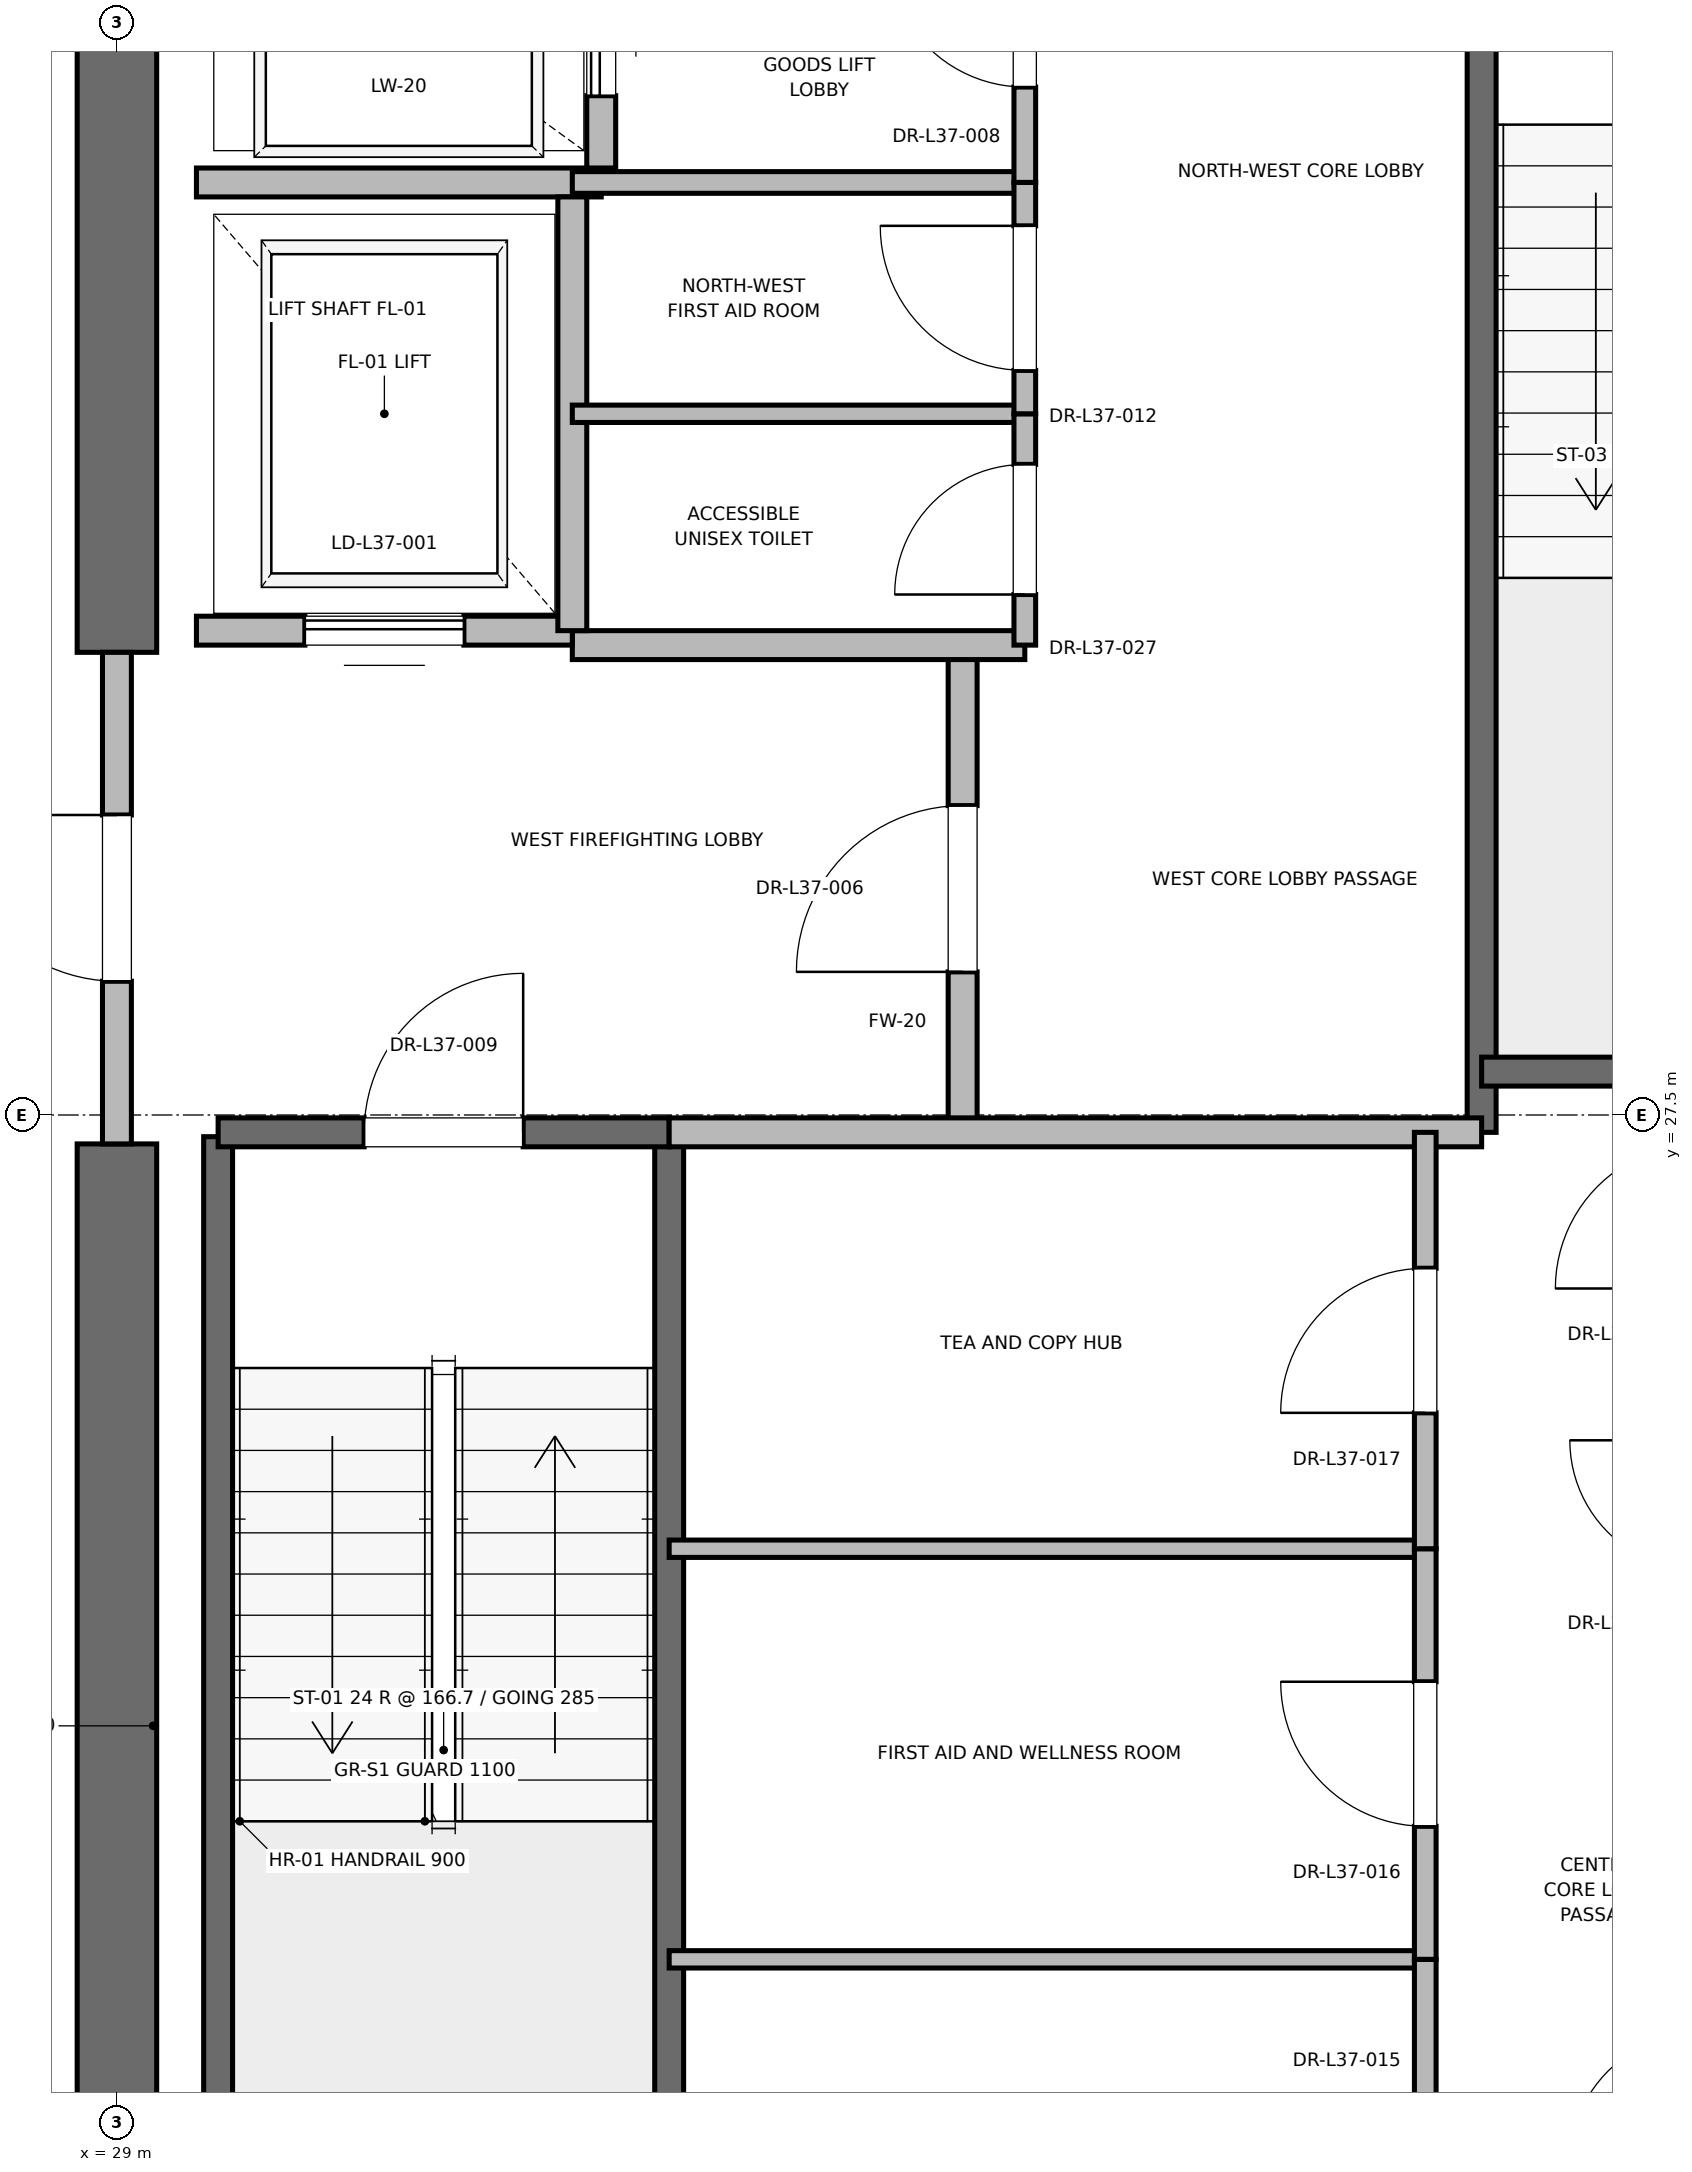
"""IFC4 building model, lengths in metres.
Left out: names, types, materials, properties, quantities, classifications, styles, units other than length and angle.
Written with IfcOpenShell. Run it as: python <this file> out.ifc"""

import sys

from ifc_helpers import new_model, si_unit, direction, frame, frame_2d, origin, place, context, subcontext, project, spatial, rectangle, extrude, element, fill, save


model = new_model("IFC4")
c1 = context("Model", 3, precision=1e-05, world=origin(), true_north=direction((0.0, 1.0)))
c2 = subcontext(c1, "Body", "Model", "MODEL_VIEW")
j1 = project(units=[si_unit("LENGTHUNIT", "METRE"), si_unit("PLANEANGLEUNIT", "RADIAN")], contexts=[c1])
p1 = place(None, origin())
s1 = spatial("IfcSite", under=j1, at=p1, CompositionType="ELEMENT")
p2 = place(p1, origin())
s2 = spatial("IfcBuilding", under=s1, at=p2, CompositionType="ELEMENT")
p3 = place(p2, frame((0.0, 0.0, 160.4)))
s3 = spatial("IfcBuildingStorey", under=s2, at=p3, CompositionType="ELEMENT", Elevation=160.4)
p4 = place(p3, frame((29.0, 18.5, 0.0), z_axis=(0.0, 0.0, 1.0), x_axis=(0.0, 1.0, 0.0)))
e1 = element("IfcWall", 1, at=p4, inside=s3, PredefinedType="SHEAR", context=c2, shape_type="SweptSolid", body=[
    extrude(rectangle(XDim=8.8, YDim=0.55, at=frame_2d((4.4, 0.0))), origin(), (0.0, 0.0, 1.0), 3.775),
])
p5 = place(p3, frame((29.0, 30.7, 0.0), z_axis=(0.0, 0.0, 1.0), x_axis=(0.0, 1.0, 0.0)))
e2 = element("IfcWall", 2, at=p5, inside=s3, PredefinedType="SHEAR", context=c2, shape_type="SweptSolid", body=[
    extrude(rectangle(XDim=5.8, YDim=0.55, at=frame_2d((2.9, 0.0))), origin(), (0.0, 0.0, 1.0), 3.775),
])
p6 = place(p3, frame((29.7, 19.2, 0.0), z_axis=(0.0, 0.0, 1.0), x_axis=(0.0, 1.0, 0.0)))
e3 = element("IfcWall", 3, at=p6, inside=s3, PredefinedType="SOLIDWALL", context=c2, shape_type="SweptSolid", body=[
    extrude(rectangle(XDim=8.15, YDim=0.2, at=frame_2d((4.075, 0.0))), origin(), (0.0, 0.0, 1.0), 3.775),
])
p7 = place(p3, frame((32.82, 18.6, 0.0), z_axis=(0.0, 0.0, 1.0), x_axis=(0.0, 1.0, 0.0)))
e4 = element("IfcWall", 4, at=p7, inside=s3, PredefinedType="SOLIDWALL", context=c2, shape_type="SweptSolid", body=[
    extrude(rectangle(XDim=8.78, YDim=0.2, at=frame_2d((4.39, 0.0))), origin(), (0.0, 0.0, 1.0), 3.775),
])
p8 = place(p3, frame((29.7, 27.38, 0.0), z_axis=(0.0, 0.0, 1.0), x_axis=(1.0, 0.0, 0.0)))
e5 = element("IfcWall", 5, at=p8, inside=s3, PredefinedType="SOLIDWALL", context=c2, shape_type="SweptSolid", body=[
    extrude(rectangle(XDim=3.12, YDim=0.2, at=frame_2d((1.56, 0.0))), origin(), (0.0, 0.0, 1.0), 3.775),
])
p9 = place(p8, frame((1.01, 0.0, 0.0)))
e6 = element("IfcOpeningElement", 6, at=p9, cuts=e5, PredefinedType="OPENING", context=c2, shape_type="SweptSolid", body=[
    extrude(rectangle(XDim=1.1, YDim=2.15, at=frame_2d((0.55, 1.075))), frame((0.0, 0.1, 0.0), z_axis=(0.0, -1.0, 0.0), x_axis=(1.0, 0.0, 0.0)), (0.0, 0.0, 1.0), 0.2),
])
p10 = place(p3, frame((38.44, 27.38, 0.0), z_axis=(0.0, 0.0, 1.0), x_axis=(0.0, 1.0, 0.0)))
e7 = element("IfcWall", 7, at=p10, inside=s3, PredefinedType="SOLIDWALL", context=c2, shape_type="SweptSolid", body=[
    extrude(rectangle(XDim=8.87, YDim=0.2, at=frame_2d((4.435, 0.0))), origin(), (0.0, 0.0, 1.0), 3.775),
])
p11 = place(p3, frame((38.44, 27.8, 0.0), z_axis=(0.0, 0.0, 1.0), x_axis=(1.0, 0.0, 0.0)))
e8 = element("IfcWall", 8, at=p11, inside=s3, PredefinedType="SOLIDWALL", context=c2, shape_type="SweptSolid", body=[
    extrude(rectangle(XDim=3.32, YDim=0.2, at=frame_2d((1.66, 0.0))), origin(), (0.0, 0.0, 1.0), 3.775),
])
p12 = place(p3, frame((34.85, 27.38, 0.0), z_axis=(0.0, 0.0, 1.0), x_axis=(0.0, 1.0, 0.0)))
e9 = element("IfcWall", 9, at=p12, inside=s3, PredefinedType="PARTITIONING", context=c2, shape_type="SweptSolid", body=[
    extrude(rectangle(XDim=3.37, YDim=0.2, at=frame_2d((1.685, 0.0))), origin(), (0.0, 0.0, 1.0), 3.775),
])
p13 = place(p12, frame((1.11, 0.0, 0.0)))
e10 = element("IfcOpeningElement", 10, at=p13, cuts=e9, PredefinedType="OPENING", context=c2, shape_type="SweptSolid", body=[
    extrude(rectangle(XDim=1.15, YDim=2.2, at=frame_2d((0.575, 1.1))), frame((0.0, 0.1, 0.0), z_axis=(0.0, -1.0, 0.0), x_axis=(1.0, 0.0, 0.0)), (0.0, 0.0, 1.0), 0.2),
])
p14 = place(p3, frame((29.0, 27.3, 0.0), z_axis=(0.0, 0.0, 1.0), x_axis=(0.0, 1.0, 0.0)))
e11 = element("IfcWall", 11, at=p14, inside=s3, PredefinedType="PARTITIONING", context=c2, shape_type="SweptSolid", body=[
    extrude(rectangle(XDim=3.4, YDim=0.2, at=frame_2d((1.7, 0.0))), origin(), (0.0, 0.0, 1.0), 2.755),
])
p15 = place(p14, frame((1.125, 0.0, 0.0)))
e12 = element("IfcOpeningElement", 12, at=p15, cuts=e11, PredefinedType="OPENING", context=c2, shape_type="SweptSolid", body=[
    extrude(rectangle(XDim=1.15, YDim=2.2, at=frame_2d((0.575, 1.1))), frame((0.0, 0.1, 0.0), z_axis=(0.0, -1.0, 0.0), x_axis=(1.0, 0.0, 0.0)), (0.0, 0.0, 1.0), 0.2),
])
p16 = place(p3, frame((32.82, 27.38, 0.0), z_axis=(0.0, 0.0, 1.0), x_axis=(1.0, 0.0, 0.0)))
e13 = element("IfcWall", 13, at=p16, inside=s3, PredefinedType="PARTITIONING", context=c2, shape_type="SweptSolid", body=[
    extrude(rectangle(XDim=5.62, YDim=0.2, at=frame_2d((2.81, 0.0))), origin(), (0.0, 0.0, 1.0), 3.775),
])
p17 = place(p3, frame((32.15, 30.75, 0.0), z_axis=(0.0, 0.0, 1.0), x_axis=(1.0, 0.0, 0.0)))
e14 = element("IfcWall", 14, at=p17, inside=s3, PredefinedType="PARTITIONING", context=c2, shape_type="SweptSolid", body=[
    extrude(rectangle(XDim=3.13, YDim=0.2, at=frame_2d((1.565, 0.0))), origin(), (0.0, 0.0, 1.0), 3.775),
])
p18 = place(p3, frame((29.55, 30.85, 0.0), z_axis=(0.0, 0.0, 1.0), x_axis=(1.0, 0.0, 0.0)))
e15 = element("IfcWall", 15, at=p18, inside=s3, PredefinedType="SOLIDWALL", context=c2, shape_type="SweptSolid", body=[
    extrude(rectangle(XDim=2.6, YDim=0.2, at=frame_2d((1.3, 0.0))), origin(), (0.0, 0.0, 1.0), 2.755),
])
p19 = place(p18, frame((0.75, 0.0, 0.0)))
e16 = element("IfcOpeningElement", 16, at=p19, cuts=e15, PredefinedType="OPENING", context=c2, shape_type="SweptSolid", body=[
    extrude(rectangle(XDim=1.1, YDim=2.2, at=frame_2d((0.55, 1.1))), frame((0.0, 0.1, 0.0), z_axis=(0.0, -1.0, 0.0), x_axis=(1.0, 0.0, 0.0)), (0.0, 0.0, 1.0), 0.2),
])
p20 = place(p3, frame((29.55, 33.95, 0.0), z_axis=(0.0, 0.0, 1.0), x_axis=(1.0, 0.0, 0.0)))
e17 = element("IfcWall", 17, at=p20, inside=s3, PredefinedType="SOLIDWALL", context=c2, shape_type="SweptSolid", body=[
    extrude(rectangle(XDim=2.8, YDim=0.2, at=frame_2d((1.4, 0.0))), origin(), (0.0, 0.0, 1.0), 3.775),
])
p21 = place(p3, frame((32.15, 30.85, 0.0), z_axis=(0.0, 0.0, 1.0), x_axis=(0.0, 1.0, 0.0)))
e18 = element("IfcWall", 18, at=p21, inside=s3, PredefinedType="SOLIDWALL", context=c2, shape_type="SweptSolid", body=[
    extrude(rectangle(XDim=3.0, YDim=0.2, at=frame_2d((1.5, 0.0))), origin(), (0.0, 0.0, 1.0), 3.775),
])
p22 = place(p3, frame((32.35, 34.05, 0.0), z_axis=(0.0, 0.0, 1.0), x_axis=(0.0, 1.0, 0.0)))
e19 = element("IfcWall", 19, at=p22, inside=s3, PredefinedType="SOLIDWALL", context=c2, shape_type="SweptSolid", body=[
    extrude(rectangle(XDim=2.1, YDim=0.2, at=frame_2d((1.05, 0.0))), origin(), (0.0, 0.0, 1.0), 3.775),
])
p23 = place(p22, frame((0.5, 0.0, 0.0)))
e20 = element("IfcOpeningElement", 20, at=p23, cuts=e19, PredefinedType="OPENING", context=c2, shape_type="SweptSolid", body=[
    extrude(rectangle(XDim=1.1, YDim=2.2, at=frame_2d((0.55, 1.1))), frame((0.0, 0.1, 0.0), z_axis=(0.0, -1.0, 0.0), x_axis=(1.0, 0.0, 0.0)), (0.0, 0.0, 1.0), 0.2),
])
p24 = place(p3, frame((32.15, 33.95, 0.0), z_axis=(0.0, 0.0, 1.0), x_axis=(1.0, 0.0, 0.0)))
e21 = element("IfcWall", 21, at=p24, inside=s3, PredefinedType="PARTITIONING", context=c2, shape_type="SweptSolid", body=[
    extrude(rectangle(XDim=3.13, YDim=0.15, at=frame_2d((1.565, 0.0))), origin(), (0.0, 0.0, 1.0), 2.85),
])
p25 = place(p3, frame((35.28, 33.95, 0.0), z_axis=(0.0, 0.0, 1.0), x_axis=(0.0, 1.0, 0.0)))
e22 = element("IfcWall", 22, at=p25, inside=s3, PredefinedType="PARTITIONING", context=c2, shape_type="SweptSolid", body=[
    extrude(rectangle(XDim=2.27, YDim=0.15, at=frame_2d((1.135, 0.0))), origin(), (0.0, 0.0, 1.0), 2.755),
])
p26 = place(p25, frame((0.66, 0.0, 0.0)))
e23 = element("IfcOpeningElement", 23, at=p26, cuts=e22, PredefinedType="OPENING", context=c2, shape_type="SweptSolid", body=[
    extrude(rectangle(XDim=0.95, YDim=2.15, at=frame_2d((0.475, 1.075))), frame((0.0, 0.075, 0.0), z_axis=(0.0, -1.0, 0.0), x_axis=(1.0, 0.0, 0.0)), (0.0, 0.0, 1.0), 0.15),
])
p27 = place(p3, frame((32.15, 32.35, 0.0), z_axis=(0.0, 0.0, 1.0), x_axis=(1.0, 0.0, 0.0)))
e24 = element("IfcWall", 24, at=p27, inside=s3, PredefinedType="PARTITIONING", context=c2, shape_type="SweptSolid", body=[
    extrude(rectangle(XDim=3.13, YDim=0.12, at=frame_2d((1.565, 0.0))), origin(), (0.0, 0.0, 1.0), 2.85),
])
p28 = place(p3, frame((35.28, 30.75, 0.0), z_axis=(0.0, 0.0, 1.0), x_axis=(0.0, 1.0, 0.0)))
e25 = element("IfcWall", 25, at=p28, inside=s3, PredefinedType="PARTITIONING", context=c2, shape_type="SweptSolid", body=[
    extrude(rectangle(XDim=1.6, YDim=0.15, at=frame_2d((0.8, 0.0))), origin(), (0.0, 0.0, 1.0), 2.85),
])
p29 = place(p28, frame((0.35, 0.0, 0.0)))
e26 = element("IfcOpeningElement", 26, at=p29, cuts=e25, PredefinedType="OPENING", context=c2, shape_type="SweptSolid", body=[
    extrude(rectangle(XDim=0.9, YDim=2.1, at=frame_2d((0.45, 1.05))), frame((0.0, 0.075, 0.0), z_axis=(0.0, -1.0, 0.0), x_axis=(1.0, 0.0, 0.0)), (0.0, 0.0, 1.0), 0.15),
])
p30 = place(p3, frame((35.28, 32.35, 0.0), z_axis=(0.0, 0.0, 1.0), x_axis=(0.0, 1.0, 0.0)))
e27 = element("IfcWall", 27, at=p30, inside=s3, PredefinedType="PARTITIONING", context=c2, shape_type="SweptSolid", body=[
    extrude(rectangle(XDim=1.6, YDim=0.15, at=frame_2d((0.8, 0.0))), origin(), (0.0, 0.0, 1.0), 2.85),
])
p31 = place(p30, frame((0.3, 0.0, 0.0)))
e28 = element("IfcOpeningElement", 28, at=p31, cuts=e27, PredefinedType="OPENING", context=c2, shape_type="SweptSolid", body=[
    extrude(rectangle(XDim=1.0, YDim=2.15, at=frame_2d((0.5, 1.075))), frame((0.0, 0.075, 0.0), z_axis=(0.0, -1.0, 0.0), x_axis=(1.0, 0.0, 0.0)), (0.0, 0.0, 1.0), 0.15),
])
for number, where, z_axis, x_axis in (
    (29, (32.82, 21.66, 0.0), (0.0, 0.0, 1.0), (1.0, 0.0, 0.0)),
    (30, (32.82, 24.5, 0.0), (0.0, 0.0, 1.0), (1.0, 0.0, 0.0)),
):
    element("IfcWall", number, at=place(p3, frame(where, z_axis=z_axis, x_axis=x_axis)), inside=s3, PredefinedType="PARTITIONING", context=c2, shape_type="SweptSolid", body=[
        extrude(rectangle(XDim=5.23, YDim=0.12, at=frame_2d((2.615, 0.0))), origin(), (0.0, 0.0, 1.0), 2.85),
    ])
p32 = place(p3, frame((38.05, 18.6, 0.0), z_axis=(0.0, 0.0, 1.0), x_axis=(0.0, 1.0, 0.0)))
e31 = element("IfcWall", 31, at=p32, inside=s3, PredefinedType="PARTITIONING", context=c2, shape_type="SweptSolid", body=[
    extrude(rectangle(XDim=3.06, YDim=0.15, at=frame_2d((1.53, 0.0))), origin(), (0.0, 0.0, 1.0), 2.755),
])
p33 = place(p32, frame((1.03, 0.0, 0.0)))
e32 = element("IfcOpeningElement", 32, at=p33, cuts=e31, PredefinedType="OPENING", context=c2, shape_type="SweptSolid", body=[
    extrude(rectangle(XDim=1.0, YDim=2.15, at=frame_2d((0.5, 1.075))), frame((0.0, 0.075, 0.0), z_axis=(0.0, -1.0, 0.0), x_axis=(1.0, 0.0, 0.0)), (0.0, 0.0, 1.0), 0.15),
])
p34 = place(p3, frame((38.05, 21.66, 0.0), z_axis=(0.0, 0.0, 1.0), x_axis=(0.0, 1.0, 0.0)))
e33 = element("IfcWall", 33, at=p34, inside=s3, PredefinedType="PARTITIONING", context=c2, shape_type="SweptSolid", body=[
    extrude(rectangle(XDim=2.84, YDim=0.15, at=frame_2d((1.42, 0.0))), origin(), (0.0, 0.0, 1.0), 2.85),
])
p35 = place(p34, frame((0.92, 0.0, 0.0)))
e34 = element("IfcOpeningElement", 34, at=p35, cuts=e33, PredefinedType="OPENING", context=c2, shape_type="SweptSolid", body=[
    extrude(rectangle(XDim=1.0, YDim=2.15, at=frame_2d((0.5, 1.075))), frame((0.0, 0.075, 0.0), z_axis=(0.0, -1.0, 0.0), x_axis=(1.0, 0.0, 0.0)), (0.0, 0.0, 1.0), 0.15),
])
p36 = place(p3, frame((38.05, 24.5, 0.0), z_axis=(0.0, 0.0, 1.0), x_axis=(0.0, 1.0, 0.0)))
e35 = element("IfcWall", 35, at=p36, inside=s3, PredefinedType="PARTITIONING", context=c2, shape_type="SweptSolid", body=[
    extrude(rectangle(XDim=2.88, YDim=0.15, at=frame_2d((1.44, 0.0))), origin(), (0.0, 0.0, 1.0), 2.85),
])
p37 = place(p36, frame((0.94, 0.0, 0.0)))
e36 = element("IfcOpeningElement", 36, at=p37, cuts=e35, PredefinedType="OPENING", context=c2, shape_type="SweptSolid", body=[
    extrude(rectangle(XDim=1.0, YDim=2.15, at=frame_2d((0.5, 1.075))), frame((0.0, 0.075, 0.0), z_axis=(0.0, -1.0, 0.0), x_axis=(1.0, 0.0, 0.0)), (0.0, 0.0, 1.0), 0.15),
])
p38 = place(p9, origin())
e37 = element("IfcDoor", 37, at=p38, inside=s3, OperationType="SINGLE_SWING_RIGHT", PredefinedType="DOOR", context=c2, shape_type="SweptSolid", body=[
    extrude(rectangle(XDim=1.1, YDim=2.15, at=frame_2d((0.55, 1.075))), frame((0.0, 0.025, 0.0), z_axis=(0.0, -1.0, 0.0), x_axis=(1.0, 0.0, 0.0)), (0.0, 0.0, 1.0), 0.05),
])
fill(e6, e37)
p39 = place(p13, origin())
e38 = element("IfcDoor", 38, at=p39, inside=s3, OperationType="SINGLE_SWING_LEFT", PredefinedType="DOOR", context=c2, shape_type="SweptSolid", body=[
    extrude(rectangle(XDim=1.15, YDim=2.2, at=frame_2d((0.575, 1.1))), frame((0.0, 0.025, 0.0), z_axis=(0.0, -1.0, 0.0), x_axis=(1.0, 0.0, 0.0)), (0.0, 0.0, 1.0), 0.05),
])
fill(e10, e38)
p40 = place(p15, origin())
e39 = element("IfcDoor", 39, at=p40, inside=s3, OperationType="SINGLE_SWING_RIGHT", PredefinedType="DOOR", context=c2, shape_type="SweptSolid", body=[
    extrude(rectangle(XDim=1.15, YDim=2.2, at=frame_2d((0.575, 1.1))), frame((0.0, 0.025, 0.0), z_axis=(0.0, -1.0, 0.0), x_axis=(1.0, 0.0, 0.0)), (0.0, 0.0, 1.0), 0.05),
])
fill(e12, e39)
p41 = place(p19, origin())
e40 = element("IfcDoor", 40, at=p41, inside=s3, OperationType="SLIDING_TO_RIGHT", PredefinedType="DOOR", context=c2, shape_type="SweptSolid", body=[
    extrude(rectangle(XDim=1.1, YDim=2.2, at=frame_2d((0.55, 1.1))), frame((0.0, 0.025, 0.0), z_axis=(0.0, -1.0, 0.0), x_axis=(1.0, 0.0, 0.0)), (0.0, 0.0, 1.0), 0.05),
])
fill(e16, e40)
p42 = place(p23, origin())
e41 = element("IfcDoor", 41, at=p42, inside=s3, OperationType="SLIDING_TO_RIGHT", PredefinedType="DOOR", context=c2, shape_type="SweptSolid", body=[
    extrude(rectangle(XDim=1.1, YDim=2.2, at=frame_2d((0.55, 1.1))), frame((0.0, 0.025, 0.0), z_axis=(0.0, -1.0, 0.0), x_axis=(1.0, 0.0, 0.0)), (0.0, 0.0, 1.0), 0.05),
])
fill(e20, e41)
p43 = place(p26, origin())
e42 = element("IfcDoor", 42, at=p43, inside=s3, OperationType="SINGLE_SWING_RIGHT", PredefinedType="DOOR", context=c2, shape_type="SweptSolid", body=[
    extrude(rectangle(XDim=0.95, YDim=2.15, at=frame_2d((0.475, 1.075))), frame((0.0, 0.025, 0.0), z_axis=(0.0, -1.0, 0.0), x_axis=(1.0, 0.0, 0.0)), (0.0, 0.0, 1.0), 0.05),
])
fill(e23, e42)
p44 = place(p29, origin())
e43 = element("IfcDoor", 43, at=p44, inside=s3, OperationType="SINGLE_SWING_LEFT", PredefinedType="DOOR", context=c2, shape_type="SweptSolid", body=[
    extrude(rectangle(XDim=0.9, YDim=2.1, at=frame_2d((0.45, 1.05))), frame((0.0, 0.025, 0.0), z_axis=(0.0, -1.0, 0.0), x_axis=(1.0, 0.0, 0.0)), (0.0, 0.0, 1.0), 0.05),
])
fill(e26, e43)
p45 = place(p31, origin())
e44 = element("IfcDoor", 44, at=p45, inside=s3, OperationType="SINGLE_SWING_RIGHT", PredefinedType="DOOR", context=c2, shape_type="SweptSolid", body=[
    extrude(rectangle(XDim=1.0, YDim=2.15, at=frame_2d((0.5, 1.075))), frame((0.0, 0.025, 0.0), z_axis=(0.0, -1.0, 0.0), x_axis=(1.0, 0.0, 0.0)), (0.0, 0.0, 1.0), 0.05),
])
fill(e28, e44)
p46 = place(p35, origin())
e45 = element("IfcDoor", 45, at=p46, inside=s3, OperationType="SINGLE_SWING_RIGHT", PredefinedType="DOOR", context=c2, shape_type="SweptSolid", body=[
    extrude(rectangle(XDim=1.0, YDim=2.15, at=frame_2d((0.5, 1.075))), frame((0.0, 0.025, 0.0), z_axis=(0.0, -1.0, 0.0), x_axis=(1.0, 0.0, 0.0)), (0.0, 0.0, 1.0), 0.05),
])
fill(e34, e45)
p47 = place(p37, origin())
e46 = element("IfcDoor", 46, at=p47, inside=s3, OperationType="SINGLE_SWING_LEFT", PredefinedType="DOOR", context=c2, shape_type="SweptSolid", body=[
    extrude(rectangle(XDim=1.0, YDim=2.15, at=frame_2d((0.5, 1.075))), frame((0.0, 0.025, 0.0), z_axis=(0.0, -1.0, 0.0), x_axis=(1.0, 0.0, 0.0)), (0.0, 0.0, 1.0), 0.05),
])
fill(e36, e46)
save(model, sys.argv[1])
